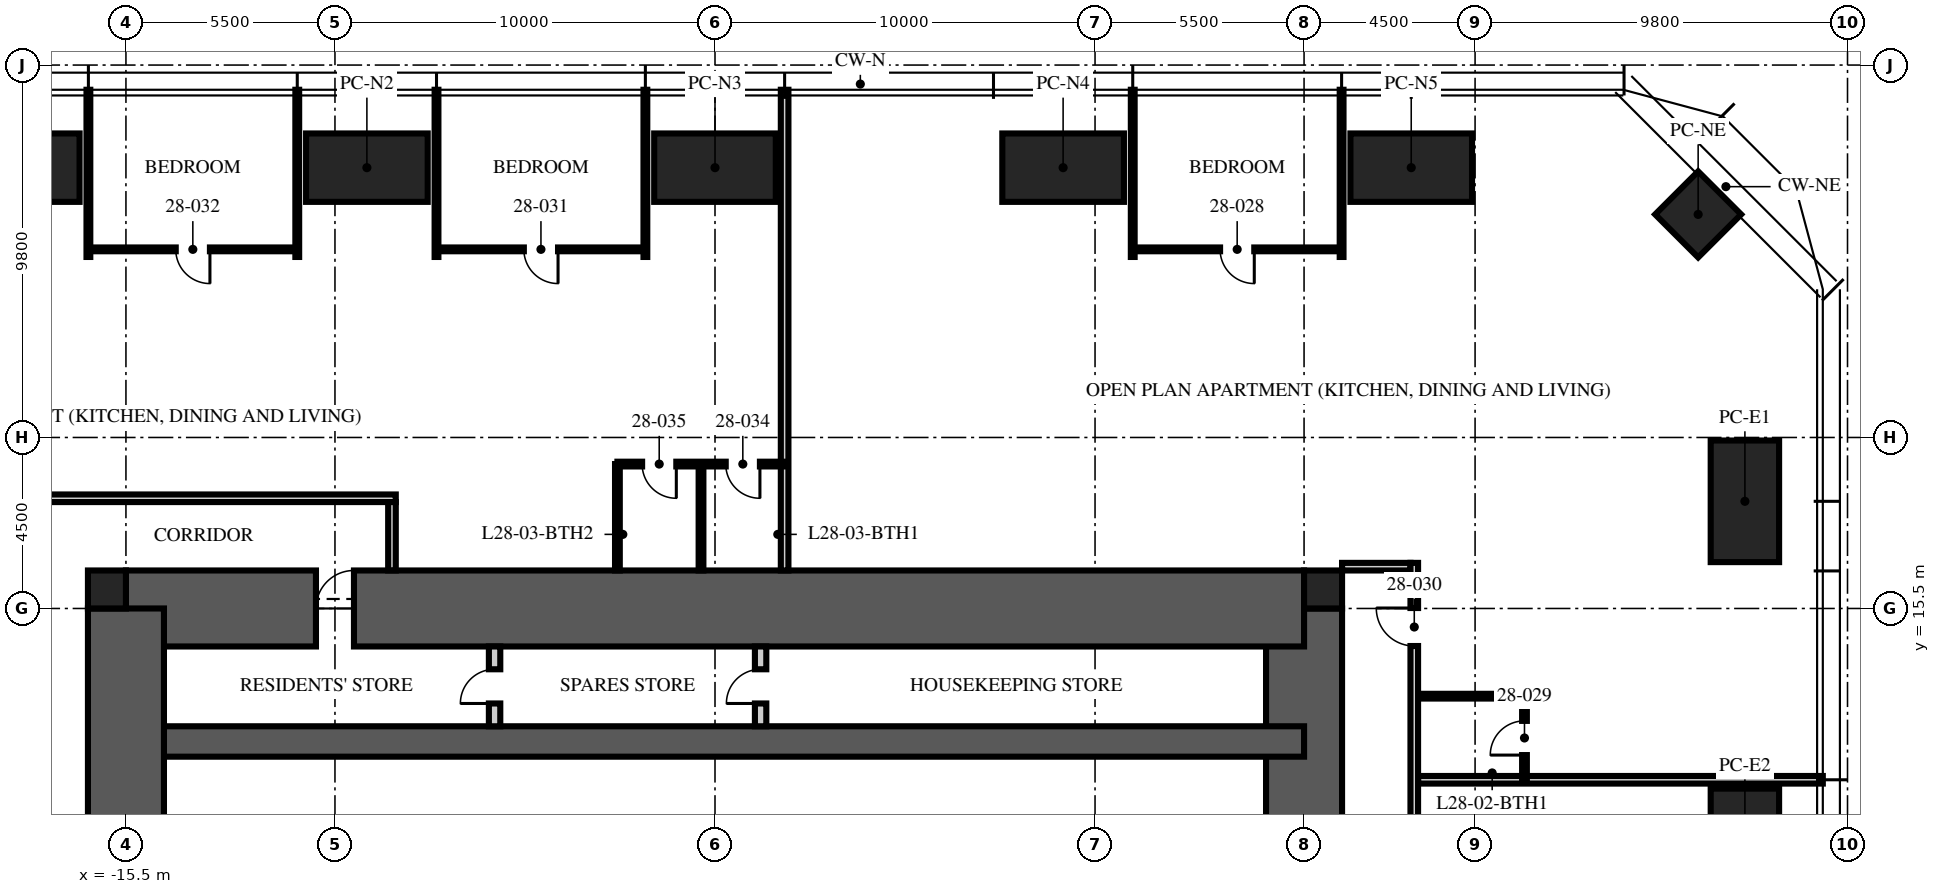
"""IFC4 building model, lengths in metres.
Left out: names, types, materials, properties, quantities, classifications, styles, units other than length and angle.
Written with IfcOpenShell. Run it as: python <this file> out.ifc"""

import sys

from ifc_helpers import new_model, si_unit, direction, frame, frame_2d, origin, origin_2d, place, context, subcontext, project, spatial, rectangle, hollow_rectangle, extrude, element, fill, save


model = new_model("IFC4")
c1 = context("Model", 3, precision=1e-05, world=origin(), true_north=direction((0.0, 1.0)))
c2 = subcontext(c1, "Body", "Model", "MODEL_VIEW")
j1 = project(units=[si_unit("LENGTHUNIT", "METRE"), si_unit("PLANEANGLEUNIT", "RADIAN")], contexts=[c1])
p1 = place(None, origin())
s1 = spatial("IfcSite", under=j1, at=p1, CompositionType="ELEMENT")
p2 = place(p1, origin())
s2 = spatial("IfcBuilding", under=s1, at=p2, CompositionType="ELEMENT")
p3 = place(p2, frame((0.0, 0.0, 114.75)))
s3 = spatial("IfcBuildingStorey", under=s2, at=p3, CompositionType="ELEMENT", Elevation=114.75)
p4 = place(p3, frame((15.5, -15.5, -0.25), z_axis=(0.0, 0.0, 1.0), x_axis=(0.0, 1.0, 0.0)))
e1 = element("IfcWall", 1, at=p4, inside=s3, PredefinedType="SHEAR", context=c2, shape_type="SweptSolid", body=[
    extrude(rectangle(XDim=31.0, YDim=2.0, at=frame_2d((15.5, 0.0))), origin(), (0.0, 0.0, 1.0), 3.75),
])
p5 = place(p4, frame((6.5, 0.0, 0.25)))
e2 = element("IfcOpeningElement", 2, at=p5, cuts=e1, PredefinedType="OPENING", context=c2, shape_type="SweptSolid", body=[
    extrude(rectangle(XDim=1.2, YDim=2.1, at=frame_2d((0.6, 1.05))), frame((0.0, 1.01, 0.0), z_axis=(0.0, -1.0, 0.0), x_axis=(1.0, 0.0, 0.0)), (0.0, 0.0, 1.0), 2.02),
])
p6 = place(p4, frame((23.0, 0.0, 0.25)))
e3 = element("IfcOpeningElement", 3, at=p6, cuts=e1, PredefinedType="OPENING", context=c2, shape_type="SweptSolid", body=[
    extrude(rectangle(XDim=1.8, YDim=2.1, at=frame_2d((0.9, 1.05))), frame((0.0, 1.01, 0.0), z_axis=(0.0, -1.0, 0.0), x_axis=(1.0, 0.0, 0.0)), (0.0, 0.0, 1.0), 2.02),
])
p7 = place(p3, frame((-15.5, 15.5, -0.25), z_axis=(0.0, 0.0, 1.0), x_axis=(1.0, 0.0, 0.0)))
e4 = element("IfcWall", 4, at=p7, inside=s3, PredefinedType="SHEAR", context=c2, shape_type="SweptSolid", body=[
    extrude(rectangle(XDim=31.0, YDim=2.0, at=frame_2d((15.5, 0.0))), origin(), (0.0, 0.0, 1.0), 3.75),
])
p8 = place(p7, frame((5.0, 0.0, 0.25)))
e5 = element("IfcOpeningElement", 5, at=p8, cuts=e4, PredefinedType="OPENING", context=c2, shape_type="SweptSolid", body=[
    extrude(rectangle(XDim=1.0, YDim=2.1, at=frame_2d((0.5, 1.05))), frame((0.0, 1.01, 0.0), z_axis=(0.0, -1.0, 0.0), x_axis=(1.0, 0.0, 0.0)), (0.0, 0.0, 1.0), 2.02),
])
p9 = place(p3, frame((-15.5, 12.0, -0.25), z_axis=(0.0, 0.0, 1.0), x_axis=(1.0, 0.0, 0.0)))
e6 = element("IfcWall", 6, at=p9, inside=s3, PredefinedType="SHEAR", context=c2, shape_type="SweptSolid", body=[
    extrude(rectangle(XDim=31.0, YDim=0.8, at=frame_2d((15.5, 0.0))), origin(), (0.0, 0.0, 1.0), 3.75),
])
p10 = place(p3, frame((-15.5, -15.5, -0.25), z_axis=(0.0, 0.0, 1.0), x_axis=(0.0, 1.0, 0.0)))
e7 = element("IfcWall", 7, at=p10, inside=s3, PredefinedType="SHEAR", context=c2, shape_type="SweptSolid", body=[
    extrude(rectangle(XDim=31.0, YDim=2.0, at=frame_2d((15.5, 0.0))), origin(), (0.0, 0.0, 1.0), 3.75),
])
p11 = place(p10, frame((6.5, 0.0, 0.25)))
e8 = element("IfcOpeningElement", 8, at=p11, cuts=e7, PredefinedType="OPENING", context=c2, shape_type="SweptSolid", body=[
    extrude(rectangle(XDim=1.2, YDim=2.1, at=frame_2d((0.6, 1.05))), frame((0.0, 1.01, 0.0), z_axis=(0.0, -1.0, 0.0), x_axis=(1.0, 0.0, 0.0)), (0.0, 0.0, 1.0), 2.02),
])
p12 = place(p10, frame((23.0, 0.0, 0.25)))
e9 = element("IfcOpeningElement", 9, at=p12, cuts=e7, PredefinedType="OPENING", context=c2, shape_type="SweptSolid", body=[
    extrude(rectangle(XDim=1.8, YDim=2.1, at=frame_2d((0.9, 1.05))), frame((0.0, 1.01, 0.0), z_axis=(0.0, -1.0, 0.0), x_axis=(1.0, 0.0, 0.0)), (0.0, 0.0, 1.0), 2.02),
])
for number, where, z_axis, x_axis in (
    (10, (16.0, 16.0, -0.25), (0.0, 0.0, 1.0), (1.0, 0.0, 0.0)),
    (11, (-16.0, 16.0, -0.25), (0.0, 0.0, 1.0), (1.0, 0.0, 0.0)),
):
    element("IfcColumn", number, at=place(p3, frame(where, z_axis=z_axis, x_axis=x_axis)), inside=s3, PredefinedType="COLUMN", context=c2, shape_type="SweptSolid", body=[
        extrude(rectangle(XDim=1.0, YDim=1.0, at=origin_2d()), origin(), (0.0, 0.0, 1.0), 3.75),
    ])
for number, where, z_axis, x_axis in (
    (12, (-18.32, 27.1, 0.0), (0.0, 0.0, 1.0), (1.0, 0.0, 0.0)),
    (13, (-9.16, 27.1, 0.0), (0.0, 0.0, 1.0), (1.0, 0.0, 0.0)),
    (14, (0.0, 27.1, 0.0), (0.0, 0.0, 1.0), (1.0, 0.0, 0.0)),
    (15, (9.16, 27.1, 0.0), (0.0, 0.0, 1.0), (1.0, 0.0, 0.0)),
    (16, (18.32, 27.1, 0.0), (0.0, 0.0, 1.0), (1.0, 0.0, 0.0)),
    (17, (27.1, 18.32, 0.0), (0.0, 0.0, 1.0), (0.0, 1.0, 0.0)),
    (18, (27.1, 9.16, 0.0), (0.0, 0.0, 1.0), (0.0, 1.0, 0.0)),
):
    element("IfcColumn", number, at=place(p3, frame(where, z_axis=z_axis, x_axis=x_axis)), inside=s3, PredefinedType="COLUMN", context=c2, shape_type="SweptSolid", body=[
        extrude(hollow_rectangle(XDim=3.2, YDim=1.8, WallThickness=0.2, at=origin_2d()), origin(), (0.0, 0.0, 1.0), 3.75),
    ])
p13 = place(p3, frame((25.87, 25.87, 0.0), z_axis=(0.0, 0.0, 1.0), x_axis=(0.707106781187, -0.707106781187, 0.0)))
e19 = element("IfcColumn", 19, at=p13, inside=s3, PredefinedType="COLUMN", context=c2, shape_type="SweptSolid", body=[
    extrude(hollow_rectangle(XDim=1.6, YDim=1.6, WallThickness=0.1, at=origin_2d()), origin(), (0.0, 0.0, 1.0), 3.75),
])
p14 = place(p3, frame((-5.8, 12.4, 0.0), z_axis=(0.0, 0.0, 1.0), x_axis=(0.0, 1.0, 0.0)))
e20 = element("IfcWall", 20, at=p14, inside=s3, PredefinedType="PARTITIONING", context=c2, shape_type="SweptSolid", body=[
    extrude(rectangle(XDim=2.1, YDim=0.3, at=frame_2d((1.05, 0.0))), origin(), (0.0, 0.0, 1.0), 3.5),
])
p15 = place(p14, frame((0.6, 0.0, 0.0)))
e21 = element("IfcOpeningElement", 21, at=p15, cuts=e20, PredefinedType="OPENING", context=c2, shape_type="SweptSolid", body=[
    extrude(rectangle(XDim=0.9, YDim=2.1, at=frame_2d((0.45, 1.05))), frame((0.0, 0.16, 0.0), z_axis=(0.0, -1.0, 0.0), x_axis=(1.0, 0.0, 0.0)), (0.0, 0.0, 1.0), 0.32),
])
p16 = place(p3, frame((1.2, 12.4, 0.0), z_axis=(0.0, 0.0, 1.0), x_axis=(0.0, 1.0, 0.0)))
e22 = element("IfcWall", 22, at=p16, inside=s3, PredefinedType="PARTITIONING", context=c2, shape_type="SweptSolid", body=[
    extrude(rectangle(XDim=2.1, YDim=0.3, at=frame_2d((1.05, 0.0))), origin(), (0.0, 0.0, 1.0), 3.5),
])
p17 = place(p16, frame((0.6, 0.0, 0.0)))
e23 = element("IfcOpeningElement", 23, at=p17, cuts=e22, PredefinedType="OPENING", context=c2, shape_type="SweptSolid", body=[
    extrude(rectangle(XDim=0.9, YDim=2.1, at=frame_2d((0.45, 1.05))), frame((0.0, 0.16, 0.0), z_axis=(0.0, -1.0, 0.0), x_axis=(1.0, 0.0, 0.0)), (0.0, 0.0, 1.0), 0.32),
])
p18 = place(p3, frame((16.5, 16.6, 0.0), z_axis=(0.0, 0.0, 1.0), x_axis=(1.0, 0.0, 0.0)))
e24 = element("IfcWall", 24, at=p18, inside=s3, PredefinedType="PARTITIONING", context=c2, shape_type="SweptSolid", body=[
    extrude(rectangle(XDim=1.8, YDim=0.2, at=frame_2d((0.9, 0.0))), origin(), (0.0, 0.0, 1.0), 2.3),
])
p19 = place(p3, frame((-18.5, 18.4, 0.0), z_axis=(0.0, 0.0, 1.0), x_axis=(1.0, 0.0, 0.0)))
e25 = element("IfcWall", 25, at=p19, inside=s3, PredefinedType="PARTITIONING", context=c2, shape_type="SweptSolid", body=[
    extrude(rectangle(XDim=10.1, YDim=0.2, at=frame_2d((5.05, 0.0))), origin(), (0.0, 0.0, 1.0), 2.3),
])
p20 = place(p3, frame((-8.5, 18.3, 0.0), z_axis=(0.0, 0.0, 1.0), x_axis=(0.0, -1.0, 0.0)))
e26 = element("IfcWall", 26, at=p20, inside=s3, PredefinedType="PARTITIONING", context=c2, shape_type="SweptSolid", body=[
    extrude(rectangle(XDim=1.8, YDim=0.2, at=frame_2d((0.9, 0.0))), origin(), (0.0, 0.0, 1.0), 3.5),
])
p21 = place(p3, frame((18.5, 10.992, 0.0), z_axis=(0.0, 0.0, 1.0), x_axis=(1.0, 0.0, 0.0)))
e27 = element("IfcWall", 27, at=p21, inside=s3, PredefinedType="PARTITIONING", context=c2, shape_type="SweptSolid", body=[
    extrude(rectangle(XDim=10.65, YDim=0.2, at=frame_2d((5.325, 0.0))), origin(), (0.0, 0.0, 1.0), 2.81),
])
for number, where, z_axis, x_axis in (
    (28, (16.488, 24.75, 0.0), (0.0, 0.0, 1.0), (0.0, 1.0, 0.0)),
    (29, (10.992, 24.75, 0.0), (0.0, 0.0, 1.0), (0.0, 1.0, 0.0)),
):
    element("IfcWall", number, at=place(p3, frame(where, z_axis=z_axis, x_axis=x_axis)), inside=s3, PredefinedType="PARTITIONING", context=c2, shape_type="SweptSolid", body=[
        extrude(rectangle(XDim=4.4, YDim=0.1, at=frame_2d((2.2, 0.0))), origin(), (0.0, 0.0, 1.0), 2.81),
    ])
p22 = place(p3, frame((1.832, 16.5, 0.0), z_axis=(0.0, 0.0, 1.0), x_axis=(0.0, 1.0, 0.0)))
e30 = element("IfcWall", 30, at=p22, inside=s3, PredefinedType="PARTITIONING", context=c2, shape_type="SweptSolid", body=[
    extrude(rectangle(XDim=12.65, YDim=0.2, at=frame_2d((6.325, 0.0))), origin(), (0.0, 0.0, 1.0), 2.81),
])
for number, where, z_axis, x_axis in (
    (31, (-1.832, 24.75, 0.0), (0.0, 0.0, 1.0), (0.0, 1.0, 0.0)),
    (32, (-7.328, 24.75, 0.0), (0.0, 0.0, 1.0), (0.0, 1.0, 0.0)),
    (33, (-10.992, 24.75, 0.0), (0.0, 0.0, 1.0), (0.0, 1.0, 0.0)),
    (34, (-16.488, 24.75, 0.0), (0.0, 0.0, 1.0), (0.0, 1.0, 0.0)),
):
    element("IfcWall", number, at=place(p3, frame(where, z_axis=z_axis, x_axis=x_axis)), inside=s3, PredefinedType="PARTITIONING", context=c2, shape_type="SweptSolid", body=[
        extrude(rectangle(XDim=4.4, YDim=0.1, at=frame_2d((2.2, 0.0))), origin(), (0.0, 0.0, 1.0), 2.81),
    ])
p23 = place(p3, frame((16.488, 24.95, 0.0), z_axis=(0.0, 0.0, 1.0), x_axis=(-1.0, 0.0, 0.0)))
e35 = element("IfcWall", 35, at=p23, inside=s3, PredefinedType="PARTITIONING", context=c2, shape_type="SweptSolid", body=[
    extrude(rectangle(XDim=5.496, YDim=0.1, at=frame_2d((2.748, 0.0))), origin(), (0.0, 0.0, 1.0), 2.81),
])
p24 = place(p23, frame((2.298, 0.0, 0.0)))
e36 = element("IfcOpeningElement", 36, at=p24, cuts=e35, PredefinedType="OPENING", context=c2, shape_type="SweptSolid", body=[
    extrude(rectangle(XDim=0.9, YDim=2.1, at=frame_2d((0.45, 1.05))), frame((0.0, 0.06, 0.0), z_axis=(0.0, -1.0, 0.0), x_axis=(1.0, 0.0, 0.0)), (0.0, 0.0, 1.0), 0.12),
])
p25 = place(p3, frame((21.3, 10.992, 0.0), z_axis=(0.0, 0.0, 1.0), x_axis=(0.0, 1.0, 0.0)))
e37 = element("IfcWall", 37, at=p25, inside=s3, PredefinedType="PARTITIONING", context=c2, shape_type="SweptSolid", body=[
    extrude(rectangle(XDim=2.2, YDim=0.125, at=frame_2d((1.1, 0.0))), origin(), (0.0, 0.0, 1.0), 3.5),
])
p26 = place(p25, frame((0.65, 0.0, 0.0)))
e38 = element("IfcOpeningElement", 38, at=p26, cuts=e37, PredefinedType="OPENING", context=c2, shape_type="SweptSolid", body=[
    extrude(rectangle(XDim=0.9, YDim=2.1, at=frame_2d((0.45, 1.05))), frame((0.0, 0.073, 0.0), z_axis=(0.0, -1.0, 0.0), x_axis=(1.0, 0.0, 0.0)), (0.0, 0.0, 1.0), 0.145),
])
p27 = place(p3, frame((18.5, 13.192, 0.0), z_axis=(0.0, 0.0, 1.0), x_axis=(1.0, 0.0, 0.0)))
e39 = element("IfcWall", 39, at=p27, inside=s3, PredefinedType="PARTITIONING", context=c2, shape_type="SweptSolid", body=[
    extrude(rectangle(XDim=2.8, YDim=0.125, at=frame_2d((1.4, 0.0))), origin(), (0.0, 0.0, 1.0), 3.5),
])
p28 = place(p3, frame((-1.832, 24.95, 0.0), z_axis=(0.0, 0.0, 1.0), x_axis=(-1.0, 0.0, 0.0)))
e40 = element("IfcWall", 40, at=p28, inside=s3, PredefinedType="PARTITIONING", context=c2, shape_type="SweptSolid", body=[
    extrude(rectangle(XDim=5.496, YDim=0.1, at=frame_2d((2.748, 0.0))), origin(), (0.0, 0.0, 1.0), 2.81),
])
p29 = place(p28, frame((2.298, 0.0, 0.0)))
e41 = element("IfcOpeningElement", 41, at=p29, cuts=e40, PredefinedType="OPENING", context=c2, shape_type="SweptSolid", body=[
    extrude(rectangle(XDim=0.9, YDim=2.1, at=frame_2d((0.45, 1.05))), frame((0.0, 0.06, 0.0), z_axis=(0.0, -1.0, 0.0), x_axis=(1.0, 0.0, 0.0)), (0.0, 0.0, 1.0), 0.12),
])
p30 = place(p3, frame((-10.992, 24.95, 0.0), z_axis=(0.0, 0.0, 1.0), x_axis=(-1.0, 0.0, 0.0)))
e42 = element("IfcWall", 42, at=p30, inside=s3, PredefinedType="PARTITIONING", context=c2, shape_type="SweptSolid", body=[
    extrude(rectangle(XDim=5.496, YDim=0.1, at=frame_2d((2.748, 0.0))), origin(), (0.0, 0.0, 1.0), 2.81),
])
p31 = place(p30, frame((2.298, 0.0, 0.0)))
e43 = element("IfcOpeningElement", 43, at=p31, cuts=e42, PredefinedType="OPENING", context=c2, shape_type="SweptSolid", body=[
    extrude(rectangle(XDim=0.9, YDim=2.1, at=frame_2d((0.45, 1.05))), frame((0.0, 0.06, 0.0), z_axis=(0.0, -1.0, 0.0), x_axis=(1.0, 0.0, 0.0)), (0.0, 0.0, 1.0), 0.12),
])
p32 = place(p3, frame((1.832, 19.3, 0.0), z_axis=(0.0, 0.0, 1.0), x_axis=(-1.0, 0.0, 0.0)))
e44 = element("IfcWall", 44, at=p32, inside=s3, PredefinedType="PARTITIONING", context=c2, shape_type="SweptSolid", body=[
    extrude(rectangle(XDim=4.4, YDim=0.125, at=frame_2d((2.2, 0.0))), origin(), (0.0, 0.0, 1.0), 2.7),
])
p33 = place(p32, frame((0.65, 0.0, 0.0)))
e45 = element("IfcOpeningElement", 45, at=p33, cuts=e44, PredefinedType="OPENING", context=c2, shape_type="SweptSolid", body=[
    extrude(rectangle(XDim=0.9, YDim=2.1, at=frame_2d((0.45, 1.05))), frame((0.0, 0.073, 0.0), z_axis=(0.0, -1.0, 0.0), x_axis=(1.0, 0.0, 0.0)), (0.0, 0.0, 1.0), 0.145),
])
p34 = place(p32, frame((2.85, 0.0, 0.0)))
e46 = element("IfcOpeningElement", 46, at=p34, cuts=e44, PredefinedType="OPENING", context=c2, shape_type="SweptSolid", body=[
    extrude(rectangle(XDim=0.9, YDim=2.1, at=frame_2d((0.45, 1.05))), frame((0.0, 0.073, 0.0), z_axis=(0.0, -1.0, 0.0), x_axis=(1.0, 0.0, 0.0)), (0.0, 0.0, 1.0), 0.145),
])
for number, where, z_axis, x_axis in (
    (47, (-0.368, 16.5, 0.0), (0.0, 0.0, 1.0), (0.0, 1.0, 0.0)),
    (48, (-2.568, 16.5, 0.0), (0.0, 0.0, 1.0), (0.0, 1.0, 0.0)),
):
    element("IfcWall", number, at=place(p3, frame(where, z_axis=z_axis, x_axis=x_axis)), inside=s3, PredefinedType="PARTITIONING", context=c2, shape_type="SweptSolid", body=[
        extrude(rectangle(XDim=2.8, YDim=0.125, at=frame_2d((1.4, 0.0))), origin(), (0.0, 0.0, 1.0), 3.5),
    ])
p35 = place(p3, frame((18.4, -5.328, 0.0), z_axis=(0.0, 0.0, 1.0), x_axis=(0.0, 1.0, 0.0)))
e49 = element("IfcWall", 49, at=p35, inside=s3, PredefinedType="PARTITIONING", context=c2, shape_type="SweptSolid", body=[
    extrude(rectangle(XDim=22.028, YDim=0.2, at=frame_2d((11.014, 0.0))), origin(), (0.0, 0.0, 1.0), 2.7),
])
p36 = place(p35, frame((19.84, 0.0, 0.0)))
e50 = element("IfcOpeningElement", 50, at=p36, cuts=e49, PredefinedType="OPENING", context=c2, shape_type="SweptSolid", body=[
    extrude(rectangle(XDim=1.0, YDim=2.2, at=frame_2d((0.5, 1.1))), frame((0.0, 0.11, 0.0), z_axis=(0.0, -1.0, 0.0), x_axis=(1.0, 0.0, 0.0)), (0.0, 0.0, 1.0), 0.22),
])
p37 = place(p15, origin())
e51 = element("IfcDoor", 51, at=p37, inside=s3, OperationType="SINGLE_SWING_LEFT", PredefinedType="DOOR", context=c2, shape_type="SweptSolid", body=[
    extrude(rectangle(XDim=0.9, YDim=2.1, at=frame_2d((0.45, 1.05))), frame((0.0, 0.025, 0.0), z_axis=(0.0, -1.0, 0.0), x_axis=(1.0, 0.0, 0.0)), (0.0, 0.0, 1.0), 0.05),
])
fill(e21, e51)
p38 = place(p17, origin())
e52 = element("IfcDoor", 52, at=p38, inside=s3, OperationType="SINGLE_SWING_LEFT", PredefinedType="DOOR", context=c2, shape_type="SweptSolid", body=[
    extrude(rectangle(XDim=0.9, YDim=2.1, at=frame_2d((0.45, 1.05))), frame((0.0, 0.025, 0.0), z_axis=(0.0, -1.0, 0.0), x_axis=(1.0, 0.0, 0.0)), (0.0, 0.0, 1.0), 0.05),
])
fill(e23, e52)
p39 = place(p8, origin())
e53 = element("IfcDoor", 53, at=p39, inside=s3, OperationType="SINGLE_SWING_RIGHT", PredefinedType="DOOR", context=c2, shape_type="SweptSolid", body=[
    extrude(rectangle(XDim=1.0, YDim=2.1, at=frame_2d((0.5, 1.05))), frame((0.0, 0.025, 0.0), z_axis=(0.0, -1.0, 0.0), x_axis=(1.0, 0.0, 0.0)), (0.0, 0.0, 1.0), 0.05),
])
fill(e5, e53)
p40 = place(p24, origin())
e54 = element("IfcDoor", 54, at=p40, inside=s3, OperationType="SINGLE_SWING_LEFT", PredefinedType="DOOR", context=c2, shape_type="SweptSolid", body=[
    extrude(rectangle(XDim=0.9, YDim=2.1, at=frame_2d((0.45, 1.05))), frame((0.0, 0.025, 0.0), z_axis=(0.0, -1.0, 0.0), x_axis=(1.0, 0.0, 0.0)), (0.0, 0.0, 1.0), 0.05),
])
fill(e36, e54)
p41 = place(p26, origin())
e55 = element("IfcDoor", 55, at=p41, inside=s3, OperationType="SINGLE_SWING_LEFT", PredefinedType="DOOR", context=c2, shape_type="SweptSolid", body=[
    extrude(rectangle(XDim=0.9, YDim=2.1, at=frame_2d((0.45, 1.05))), frame((0.0, 0.025, 0.0), z_axis=(0.0, -1.0, 0.0), x_axis=(1.0, 0.0, 0.0)), (0.0, 0.0, 1.0), 0.05),
])
fill(e38, e55)
p42 = place(p36, origin())
e56 = element("IfcDoor", 56, at=p42, inside=s3, OperationType="SINGLE_SWING_RIGHT", PredefinedType="DOOR", context=c2, shape_type="SweptSolid", body=[
    extrude(rectangle(XDim=1.0, YDim=2.2, at=frame_2d((0.5, 1.1))), frame((0.0, 0.025, 0.0), z_axis=(0.0, -1.0, 0.0), x_axis=(1.0, 0.0, 0.0)), (0.0, 0.0, 1.0), 0.05),
])
fill(e50, e56)
p43 = place(p29, origin())
e57 = element("IfcDoor", 57, at=p43, inside=s3, OperationType="SINGLE_SWING_LEFT", PredefinedType="DOOR", context=c2, shape_type="SweptSolid", body=[
    extrude(rectangle(XDim=0.9, YDim=2.1, at=frame_2d((0.45, 1.05))), frame((0.0, 0.025, 0.0), z_axis=(0.0, -1.0, 0.0), x_axis=(1.0, 0.0, 0.0)), (0.0, 0.0, 1.0), 0.05),
])
fill(e41, e57)
p44 = place(p31, origin())
e58 = element("IfcDoor", 58, at=p44, inside=s3, OperationType="SINGLE_SWING_LEFT", PredefinedType="DOOR", context=c2, shape_type="SweptSolid", body=[
    extrude(rectangle(XDim=0.9, YDim=2.1, at=frame_2d((0.45, 1.05))), frame((0.0, 0.025, 0.0), z_axis=(0.0, -1.0, 0.0), x_axis=(1.0, 0.0, 0.0)), (0.0, 0.0, 1.0), 0.05),
])
fill(e43, e58)
p45 = place(p33, origin())
e59 = element("IfcDoor", 59, at=p45, inside=s3, OperationType="SINGLE_SWING_LEFT", PredefinedType="DOOR", context=c2, shape_type="SweptSolid", body=[
    extrude(rectangle(XDim=0.9, YDim=2.1, at=frame_2d((0.45, 1.05))), frame((0.0, 0.025, 0.0), z_axis=(0.0, -1.0, 0.0), x_axis=(1.0, 0.0, 0.0)), (0.0, 0.0, 1.0), 0.05),
])
fill(e45, e59)
p46 = place(p34, origin())
e60 = element("IfcDoor", 60, at=p46, inside=s3, OperationType="SINGLE_SWING_LEFT", PredefinedType="DOOR", context=c2, shape_type="SweptSolid", body=[
    extrude(rectangle(XDim=0.9, YDim=2.1, at=frame_2d((0.45, 1.05))), frame((0.0, 0.025, 0.0), z_axis=(0.0, -1.0, 0.0), x_axis=(1.0, 0.0, 0.0)), (0.0, 0.0, 1.0), 0.05),
])
fill(e46, e60)
save(model, sys.argv[1])
